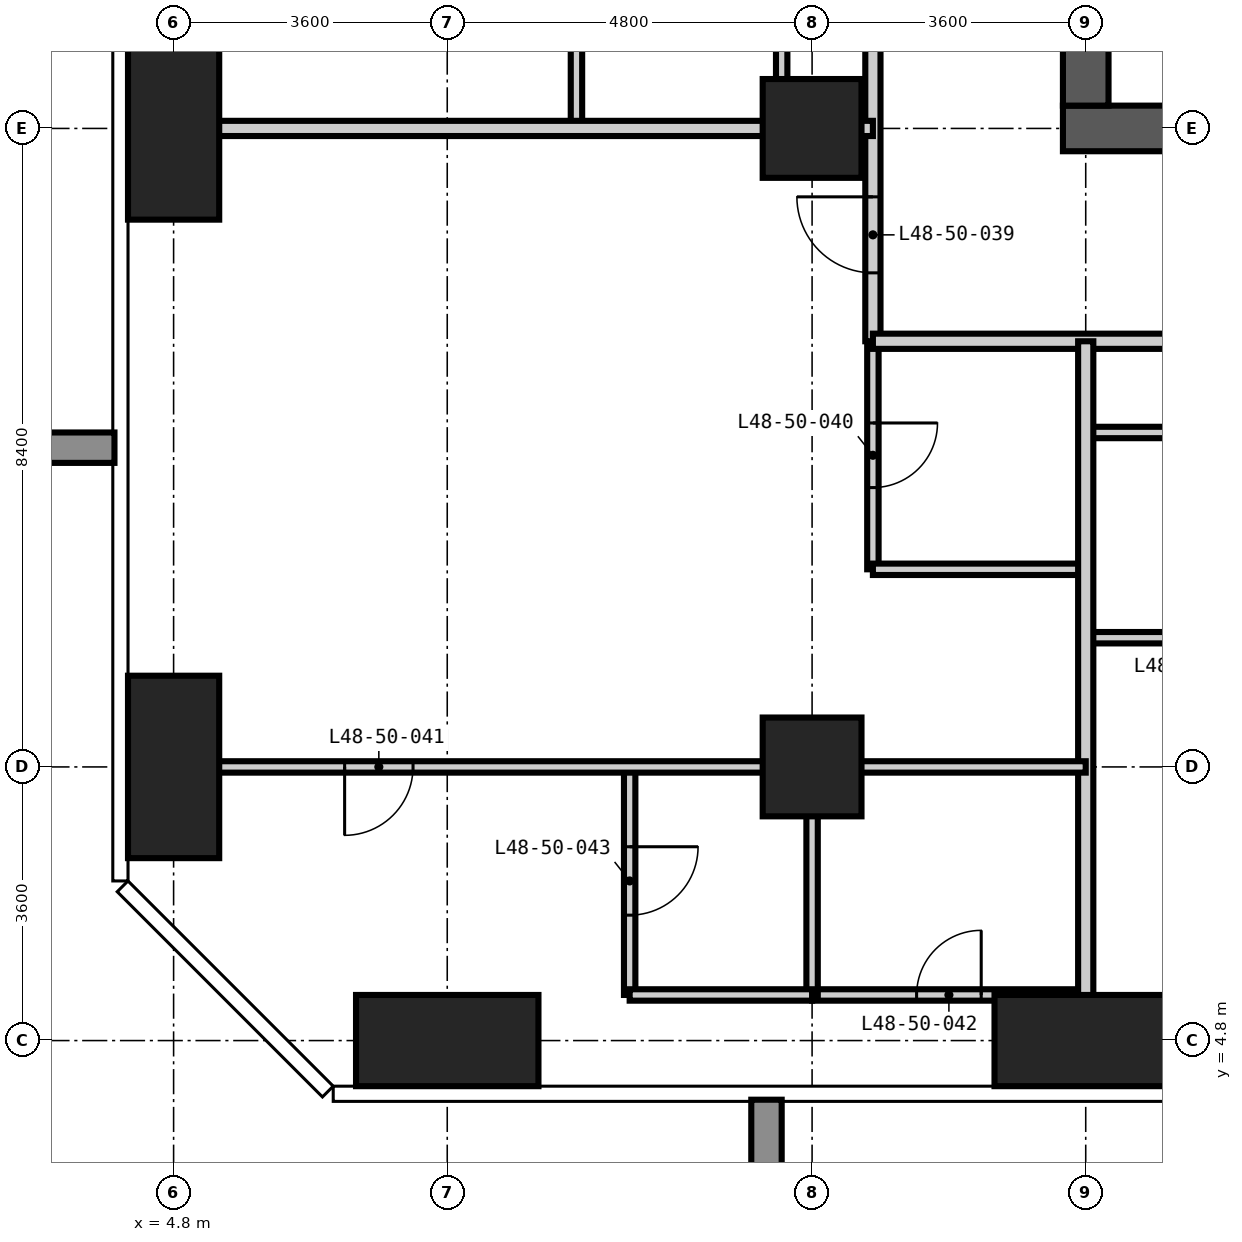
"""IFC4 building model, lengths in metres.
Left out: names, types, materials, properties, quantities, classifications, styles, units other than length and angle.
Written with IfcOpenShell. Run it as: python <this file> out.ifc"""

import sys

from ifc_helpers import new_model, si_unit, direction, frame, frame_2d, origin, origin_2d, place, context, subcontext, project, spatial, rectangle, extrude, element, fill, save


model = new_model("IFC4")
c1 = context("Model", 3, precision=1e-05, world=origin(), true_north=direction((0.0, 1.0)))
c2 = subcontext(c1, "Body", "Model", "MODEL_VIEW")
j1 = project(units=[si_unit("LENGTHUNIT", "METRE"), si_unit("PLANEANGLEUNIT", "RADIAN")], contexts=[c1])
p1 = place(None, origin())
s1 = spatial("IfcSite", under=j1, at=p1, CompositionType="ELEMENT")
p2 = place(p1, origin())
s2 = spatial("IfcBuilding", under=s1, at=p2, CompositionType="ELEMENT")
p3 = place(p2, frame((0.0, 0.0, 187.8)))
s3 = spatial("IfcBuildingStorey", under=s2, at=p3, CompositionType="ELEMENT", Elevation=187.8)
for number, where, z_axis, x_axis in (
    (1, (4.8, 8.4, -0.35), (0.0, 0.0, 1.0), (1.0, 0.0, 0.0)),
    (2, (4.8, 16.8, -0.35), (0.0, 0.0, 1.0), (1.0, 0.0, 0.0)),
):
    element("IfcColumn", number, at=place(p3, frame(where, z_axis=z_axis, x_axis=x_axis)), inside=s3, PredefinedType="COLUMN", context=c2, shape_type="SweptSolid", body=[
        extrude(rectangle(XDim=1.2, YDim=2.4, at=origin_2d()), origin(), (0.0, 0.0, 1.0), 3.6),
    ])
p4 = place(p3, frame((8.4, 4.8, -0.35), z_axis=(0.0, 0.0, 1.0), x_axis=(1.0, 0.0, 0.0)))
e3 = element("IfcColumn", 3, at=p4, inside=s3, PredefinedType="COLUMN", context=c2, shape_type="SweptSolid", body=[
    extrude(rectangle(XDim=2.4, YDim=1.2, at=origin_2d()), origin(), (0.0, 0.0, 1.0), 3.6),
])
for number, where, z_axis, x_axis in (
    (4, (13.2, 8.4, -0.35), (0.0, 0.0, 1.0), (1.0, 0.0, 0.0)),
    (5, (13.2, 16.8, -0.35), (0.0, 0.0, 1.0), (1.0, 0.0, 0.0)),
):
    element("IfcColumn", number, at=place(p3, frame(where, z_axis=z_axis, x_axis=x_axis)), inside=s3, PredefinedType="COLUMN", context=c2, shape_type="SweptSolid", body=[
        extrude(rectangle(XDim=1.3, YDim=1.3, at=origin_2d()), origin(), (0.0, 0.0, 1.0), 3.6),
    ])
p5 = place(p3, frame((16.8, 4.8, -0.35), z_axis=(0.0, 0.0, 1.0), x_axis=(1.0, 0.0, 0.0)))
e6 = element("IfcColumn", 6, at=p5, inside=s3, PredefinedType="COLUMN", context=c2, shape_type="SweptSolid", body=[
    extrude(rectangle(XDim=2.4, YDim=1.2, at=origin_2d()), origin(), (0.0, 0.0, 1.0), 3.6),
])
p6 = place(p3, frame((16.5, 16.8, -0.35), z_axis=(0.0, 0.0, 1.0), x_axis=(1.0, 0.0, 0.0)))
e7 = element("IfcWall", 7, at=p6, inside=s3, PredefinedType="SHEAR", context=c2, shape_type="SweptSolid", body=[
    extrude(rectangle(XDim=25.8, YDim=0.6, at=frame_2d((12.9, 0.0))), origin(), (0.0, 0.0, 1.0), 3.6),
])
p7 = place(p6, frame((12.4, 0.0, 0.35)))
e8 = element("IfcOpeningElement", 8, at=p7, cuts=e7, PredefinedType="OPENING", context=c2, shape_type="SweptSolid", body=[
    extrude(rectangle(XDim=1.0, YDim=2.1, at=frame_2d((0.5, 1.05))), frame((0.0, 0.31, 0.0), z_axis=(0.0, -1.0, 0.0), x_axis=(1.0, 0.0, 0.0)), (0.0, 0.0, 1.0), 0.62),
])
p8 = place(p6, frame((18.7, 0.0, 0.35)))
e9 = element("IfcOpeningElement", 9, at=p8, cuts=e7, PredefinedType="OPENING", context=c2, shape_type="SweptSolid", body=[
    extrude(rectangle(XDim=1.0, YDim=2.1, at=frame_2d((0.5, 1.05))), frame((0.0, 0.31, 0.0), z_axis=(0.0, -1.0, 0.0), x_axis=(1.0, 0.0, 0.0)), (0.0, 0.0, 1.0), 0.62),
])
p9 = place(p3, frame((16.8, 41.7, -0.35), z_axis=(0.0, 0.0, 1.0), x_axis=(0.0, -1.0, 0.0)))
e10 = element("IfcWall", 10, at=p9, inside=s3, PredefinedType="SHEAR", context=c2, shape_type="SweptSolid", body=[
    extrude(rectangle(XDim=24.6, YDim=0.6, at=frame_2d((12.3, 0.0))), origin(), (0.0, 0.0, 1.0), 3.6),
])
p10 = place(p9, frame((11.4, 0.0, 0.35)))
e11 = element("IfcOpeningElement", 11, at=p10, cuts=e10, PredefinedType="OPENING", context=c2, shape_type="SweptSolid", body=[
    extrude(rectangle(XDim=1.8, YDim=2.2, at=frame_2d((0.9, 1.1))), frame((0.0, 0.31, 0.0), z_axis=(0.0, -1.0, 0.0), x_axis=(1.0, 0.0, 0.0)), (0.0, 0.0, 1.0), 0.62),
])
p11 = place(p9, frame((20.2, 0.0, 0.35)))
e12 = element("IfcOpeningElement", 12, at=p11, cuts=e10, PredefinedType="OPENING", context=c2, shape_type="SweptSolid", body=[
    extrude(rectangle(XDim=1.0, YDim=2.1, at=frame_2d((0.5, 1.05))), frame((0.0, 0.31, 0.0), z_axis=(0.0, -1.0, 0.0), x_axis=(1.0, 0.0, 0.0)), (0.0, 0.0, 1.0), 0.62),
])
p12 = place(p9, frame((5.5, 0.0, 0.35)))
e13 = element("IfcOpeningElement", 13, at=p12, cuts=e10, PredefinedType="OPENING", context=c2, shape_type="SweptSolid", body=[
    extrude(rectangle(XDim=1.0, YDim=2.1, at=frame_2d((0.5, 1.05))), frame((0.0, 0.31, 0.0), z_axis=(0.0, -1.0, 0.0), x_axis=(1.0, 0.0, 0.0)), (0.0, 0.0, 1.0), 0.62),
])
p13 = place(p3, frame((10.1, 16.8, 0.0), z_axis=(0.0, 0.0, 1.0), x_axis=(0.0, 1.0, 0.0)))
e14 = element("IfcWall", 14, at=p13, inside=s3, PredefinedType="PARTITIONING", context=c2, shape_type="SweptSolid", body=[
    extrude(rectangle(XDim=3.0, YDim=0.15, at=frame_2d((1.5, 0.0))), origin(), (0.0, 0.0, 1.0), 3.25),
])
p14 = place(p3, frame((12.8, 16.8, 0.0), z_axis=(0.0, 0.0, 1.0), x_axis=(0.0, 1.0, 0.0)))
e15 = element("IfcWall", 15, at=p14, inside=s3, PredefinedType="PARTITIONING", context=c2, shape_type="SweptSolid", body=[
    extrude(rectangle(XDim=3.0, YDim=0.15, at=frame_2d((1.5, 0.0))), origin(), (0.0, 0.0, 1.0), 3.25),
])
p15 = place(p14, frame((1.075, 0.0, 0.0)))
e16 = element("IfcOpeningElement", 16, at=p15, cuts=e15, PredefinedType="OPENING", context=c2, shape_type="SweptSolid", body=[
    extrude(rectangle(XDim=0.85, YDim=2.1, at=frame_2d((0.425, 1.05))), frame((0.0, 0.085, 0.0), z_axis=(0.0, -1.0, 0.0), x_axis=(1.0, 0.0, 0.0)), (0.0, 0.0, 1.0), 0.17),
])
p16 = place(p3, frame((14.0, 11.0, 0.0), z_axis=(0.0, 0.0, 1.0), x_axis=(0.0, 1.0, 0.0)))
e17 = element("IfcWall", 17, at=p16, inside=s3, PredefinedType="PARTITIONING", context=c2, shape_type="SweptSolid", body=[
    extrude(rectangle(XDim=3.0, YDim=0.15, at=frame_2d((1.5, 0.0))), origin(), (0.0, 0.0, 1.0), 3.25),
])
p17 = place(p16, frame((1.075, 0.0, 0.0)))
e18 = element("IfcOpeningElement", 18, at=p17, cuts=e17, PredefinedType="OPENING", context=c2, shape_type="SweptSolid", body=[
    extrude(rectangle(XDim=0.85, YDim=2.1, at=frame_2d((0.425, 1.05))), frame((0.0, 0.085, 0.0), z_axis=(0.0, -1.0, 0.0), x_axis=(1.0, 0.0, 0.0)), (0.0, 0.0, 1.0), 0.17),
])
p18 = place(p3, frame((13.2, 5.4, 0.0), z_axis=(0.0, 0.0, 1.0), x_axis=(1.0, 0.0, 0.0)))
e19 = element("IfcWall", 19, at=p18, inside=s3, PredefinedType="PARTITIONING", context=c2, shape_type="SweptSolid", body=[
    extrude(rectangle(XDim=3.6, YDim=0.15, at=frame_2d((1.8, 0.0))), origin(), (0.0, 0.0, 1.0), 3.25),
])
p19 = place(p18, frame((1.375, 0.0, 0.0)))
e20 = element("IfcOpeningElement", 20, at=p19, cuts=e19, PredefinedType="OPENING", context=c2, shape_type="SweptSolid", body=[
    extrude(rectangle(XDim=0.85, YDim=2.1, at=frame_2d((0.425, 1.05))), frame((0.0, 0.085, 0.0), z_axis=(0.0, -1.0, 0.0), x_axis=(1.0, 0.0, 0.0)), (0.0, 0.0, 1.0), 0.17),
])
p20 = place(p3, frame((16.8, 10.1, 0.0), z_axis=(0.0, 0.0, 1.0), x_axis=(1.0, 0.0, 0.0)))
e21 = element("IfcWall", 21, at=p20, inside=s3, PredefinedType="PARTITIONING", context=c2, shape_type="SweptSolid", body=[
    extrude(rectangle(XDim=3.0, YDim=0.15, at=frame_2d((1.5, 0.0))), origin(), (0.0, 0.0, 1.0), 3.25),
])
p21 = place(p20, frame((1.075, 0.0, 0.0)))
e22 = element("IfcOpeningElement", 22, at=p21, cuts=e21, PredefinedType="OPENING", context=c2, shape_type="SweptSolid", body=[
    extrude(rectangle(XDim=0.85, YDim=2.1, at=frame_2d((0.425, 1.05))), frame((0.0, 0.085, 0.0), z_axis=(0.0, -1.0, 0.0), x_axis=(1.0, 0.0, 0.0)), (0.0, 0.0, 1.0), 0.17),
])
p22 = place(p3, frame((14.0, 11.0, 0.0), z_axis=(0.0, 0.0, 1.0), x_axis=(1.0, 0.0, 0.0)))
e23 = element("IfcWall", 23, at=p22, inside=s3, PredefinedType="PARTITIONING", context=c2, shape_type="SweptSolid", body=[
    extrude(rectangle(XDim=2.8, YDim=0.15, at=frame_2d((1.4, 0.0))), origin(), (0.0, 0.0, 1.0), 3.25),
])
p23 = place(p3, frame((16.8, 12.8, 0.0), z_axis=(0.0, 0.0, 1.0), x_axis=(1.0, 0.0, 0.0)))
e24 = element("IfcWall", 24, at=p23, inside=s3, PredefinedType="PARTITIONING", context=c2, shape_type="SweptSolid", body=[
    extrude(rectangle(XDim=3.0, YDim=0.15, at=frame_2d((1.5, 0.0))), origin(), (0.0, 0.0, 1.0), 3.25),
])
p24 = place(p3, frame((14.0, 14.0, 0.0), z_axis=(0.0, 0.0, 1.0), x_axis=(0.0, 1.0, 0.0)))
e25 = element("IfcWall", 25, at=p24, inside=s3, PredefinedType="PARTITIONING", context=c2, shape_type="SweptSolid", body=[
    extrude(rectangle(XDim=30.2, YDim=0.2, at=frame_2d((15.1, 0.0))), origin(), (0.0, 0.0, 1.0), 3.25),
])
p25 = place(p24, frame((6.5, 0.0, 0.0)))
e26 = element("IfcOpeningElement", 26, at=p25, cuts=e25, PredefinedType="OPENING", context=c2, shape_type="SweptSolid", body=[
    extrude(rectangle(XDim=1.0, YDim=2.2, at=frame_2d((0.5, 1.1))), frame((0.0, 0.11, 0.0), z_axis=(0.0, -1.0, 0.0), x_axis=(1.0, 0.0, 0.0)), (0.0, 0.0, 1.0), 0.22),
])
p26 = place(p24, frame((14.9, 0.0, 0.0)))
e27 = element("IfcOpeningElement", 27, at=p26, cuts=e25, PredefinedType="OPENING", context=c2, shape_type="SweptSolid", body=[
    extrude(rectangle(XDim=1.0, YDim=2.2, at=frame_2d((0.5, 1.1))), frame((0.0, 0.11, 0.0), z_axis=(0.0, -1.0, 0.0), x_axis=(1.0, 0.0, 0.0)), (0.0, 0.0, 1.0), 0.22),
])
p27 = place(p24, frame((23.3, 0.0, 0.0)))
e28 = element("IfcOpeningElement", 28, at=p27, cuts=e25, PredefinedType="OPENING", context=c2, shape_type="SweptSolid", body=[
    extrude(rectangle(XDim=1.0, YDim=2.2, at=frame_2d((0.5, 1.1))), frame((0.0, 0.11, 0.0), z_axis=(0.0, -1.0, 0.0), x_axis=(1.0, 0.0, 0.0)), (0.0, 0.0, 1.0), 0.22),
])
p28 = place(p24, frame((0.9, 0.0, 0.0)))
e29 = element("IfcOpeningElement", 29, at=p28, cuts=e25, PredefinedType="OPENING", context=c2, shape_type="SweptSolid", body=[
    extrude(rectangle(XDim=1.0, YDim=2.2, at=frame_2d((0.5, 1.1))), frame((0.0, 0.11, 0.0), z_axis=(0.0, -1.0, 0.0), x_axis=(1.0, 0.0, 0.0)), (0.0, 0.0, 1.0), 0.22),
])
p29 = place(p24, frame((28.7, 0.0, 0.0)))
e30 = element("IfcOpeningElement", 30, at=p29, cuts=e25, PredefinedType="OPENING", context=c2, shape_type="SweptSolid", body=[
    extrude(rectangle(XDim=1.0, YDim=2.2, at=frame_2d((0.5, 1.1))), frame((0.0, 0.11, 0.0), z_axis=(0.0, -1.0, 0.0), x_axis=(1.0, 0.0, 0.0)), (0.0, 0.0, 1.0), 0.22),
])
p30 = place(p3, frame((45.4, 14.0, 0.0), z_axis=(0.0, 0.0, 1.0), x_axis=(-1.0, 0.0, 0.0)))
e31 = element("IfcWall", 31, at=p30, inside=s3, PredefinedType="PARTITIONING", context=c2, shape_type="SweptSolid", body=[
    extrude(rectangle(XDim=31.4, YDim=0.2, at=frame_2d((15.7, 0.0))), origin(), (0.0, 0.0, 1.0), 3.25),
])
p31 = place(p30, frame((26.0, 0.0, 0.0)))
e32 = element("IfcOpeningElement", 32, at=p31, cuts=e31, PredefinedType="OPENING", context=c2, shape_type="SweptSolid", body=[
    extrude(rectangle(XDim=1.0, YDim=2.2, at=frame_2d((0.5, 1.1))), frame((0.0, 0.11, 0.0), z_axis=(0.0, -1.0, 0.0), x_axis=(1.0, 0.0, 0.0)), (0.0, 0.0, 1.0), 0.22),
])
p32 = place(p30, frame((19.7, 0.0, 0.0)))
e33 = element("IfcOpeningElement", 33, at=p32, cuts=e31, PredefinedType="OPENING", context=c2, shape_type="SweptSolid", body=[
    extrude(rectangle(XDim=1.0, YDim=2.2, at=frame_2d((0.5, 1.1))), frame((0.0, 0.11, 0.0), z_axis=(0.0, -1.0, 0.0), x_axis=(1.0, 0.0, 0.0)), (0.0, 0.0, 1.0), 0.22),
])
p33 = place(p30, frame((11.3, 0.0, 0.0)))
e34 = element("IfcOpeningElement", 34, at=p33, cuts=e31, PredefinedType="OPENING", context=c2, shape_type="SweptSolid", body=[
    extrude(rectangle(XDim=1.0, YDim=2.2, at=frame_2d((0.5, 1.1))), frame((0.0, 0.11, 0.0), z_axis=(0.0, -1.0, 0.0), x_axis=(1.0, 0.0, 0.0)), (0.0, 0.0, 1.0), 0.22),
])
p34 = place(p30, frame((5.0, 0.0, 0.0)))
e35 = element("IfcOpeningElement", 35, at=p34, cuts=e31, PredefinedType="OPENING", context=c2, shape_type="SweptSolid", body=[
    extrude(rectangle(XDim=1.0, YDim=2.2, at=frame_2d((0.5, 1.1))), frame((0.0, 0.11, 0.0), z_axis=(0.0, -1.0, 0.0), x_axis=(1.0, 0.0, 0.0)), (0.0, 0.0, 1.0), 0.22),
])
for number, where, z_axis, x_axis in (
    (36, (16.8, 4.182, 0.0), (0.0, 0.0, 1.0), (0.0, 1.0, 0.0)),
    (37, (4.182, 16.8, 0.0), (0.0, 0.0, 1.0), (1.0, 0.0, 0.0)),
):
    element("IfcWall", number, at=place(p3, frame(where, z_axis=z_axis, x_axis=x_axis)), inside=s3, PredefinedType="PARTITIONING", context=c2, shape_type="SweptSolid", body=[
        extrude(rectangle(XDim=9.818, YDim=0.2, at=frame_2d((4.909, 0.0))), origin(), (0.0, 0.0, 1.0), 3.25),
    ])
p35 = place(p3, frame((10.8, 5.4, 0.0), z_axis=(0.0, 0.0, 1.0), x_axis=(0.0, 1.0, 0.0)))
e38 = element("IfcWall", 38, at=p35, inside=s3, PredefinedType="PARTITIONING", context=c2, shape_type="SweptSolid", body=[
    extrude(rectangle(XDim=3.0, YDim=0.15, at=frame_2d((1.5, 0.0))), origin(), (0.0, 0.0, 1.0), 3.25),
])
p36 = place(p35, frame((1.05, 0.0, 0.0)))
e39 = element("IfcOpeningElement", 39, at=p36, cuts=e38, PredefinedType="OPENING", context=c2, shape_type="SweptSolid", body=[
    extrude(rectangle(XDim=0.9, YDim=2.1, at=frame_2d((0.45, 1.05))), frame((0.0, 0.085, 0.0), z_axis=(0.0, -1.0, 0.0), x_axis=(1.0, 0.0, 0.0)), (0.0, 0.0, 1.0), 0.17),
])
p37 = place(p3, frame((13.2, 5.4, 0.0), z_axis=(0.0, 0.0, 1.0), x_axis=(0.0, 1.0, 0.0)))
e40 = element("IfcWall", 40, at=p37, inside=s3, PredefinedType="PARTITIONING", context=c2, shape_type="SweptSolid", body=[
    extrude(rectangle(XDim=3.0, YDim=0.15, at=frame_2d((1.5, 0.0))), origin(), (0.0, 0.0, 1.0), 3.25),
])
p38 = place(p3, frame((10.8, 5.4, 0.0), z_axis=(0.0, 0.0, 1.0), x_axis=(1.0, 0.0, 0.0)))
e41 = element("IfcWall", 41, at=p38, inside=s3, PredefinedType="PARTITIONING", context=c2, shape_type="SweptSolid", body=[
    extrude(rectangle(XDim=2.4, YDim=0.15, at=frame_2d((1.2, 0.0))), origin(), (0.0, 0.0, 1.0), 3.25),
])
p39 = place(p3, frame((4.182, 8.4, 0.0), z_axis=(0.0, 0.0, 1.0), x_axis=(1.0, 0.0, 0.0)))
e42 = element("IfcWall", 42, at=p39, inside=s3, PredefinedType="PARTITIONING", context=c2, shape_type="SweptSolid", body=[
    extrude(rectangle(XDim=12.618, YDim=0.15, at=frame_2d((6.309, 0.0))), origin(), (0.0, 0.0, 1.0), 3.25),
])
p40 = place(p39, frame((2.868, 0.0, 0.0)))
e43 = element("IfcOpeningElement", 43, at=p40, cuts=e42, PredefinedType="OPENING", context=c2, shape_type="SweptSolid", body=[
    extrude(rectangle(XDim=0.9, YDim=2.1, at=frame_2d((0.45, 1.05))), frame((0.0, 0.085, 0.0), z_axis=(0.0, -1.0, 0.0), x_axis=(1.0, 0.0, 0.0)), (0.0, 0.0, 1.0), 0.17),
])
p41 = place(p28, origin())
e44 = element("IfcDoor", 44, at=p41, inside=s3, OperationType="SINGLE_SWING_RIGHT", PredefinedType="DOOR", context=c2, shape_type="SweptSolid", body=[
    extrude(rectangle(XDim=1.0, YDim=2.2, at=frame_2d((0.5, 1.1))), frame((0.0, 0.025, 0.0), z_axis=(0.0, -1.0, 0.0), x_axis=(1.0, 0.0, 0.0)), (0.0, 0.0, 1.0), 0.05),
])
fill(e29, e44)
p42 = place(p17, frame((0.85, 0.0, 0.0), z_axis=(0.0, 0.0, 1.0), x_axis=(-1.0, 0.0, 0.0)))
e45 = element("IfcDoor", 45, at=p42, inside=s3, OperationType="SINGLE_SWING_LEFT", PredefinedType="DOOR", context=c2, shape_type="SweptSolid", body=[
    extrude(rectangle(XDim=0.85, YDim=2.1, at=frame_2d((0.425, 1.05))), frame((0.0, 0.025, 0.0), z_axis=(0.0, -1.0, 0.0), x_axis=(1.0, 0.0, 0.0)), (0.0, 0.0, 1.0), 0.05),
])
fill(e18, e45)
p43 = place(p40, frame((0.9, 0.0, 0.0), z_axis=(0.0, 0.0, 1.0), x_axis=(-1.0, 0.0, 0.0)))
e46 = element("IfcDoor", 46, at=p43, inside=s3, OperationType="SINGLE_SWING_RIGHT", PredefinedType="DOOR", context=c2, shape_type="SweptSolid", body=[
    extrude(rectangle(XDim=0.9, YDim=2.1, at=frame_2d((0.45, 1.05))), frame((0.0, 0.025, 0.0), z_axis=(0.0, -1.0, 0.0), x_axis=(1.0, 0.0, 0.0)), (0.0, 0.0, 1.0), 0.05),
])
fill(e43, e46)
p44 = place(p19, origin())
e47 = element("IfcDoor", 47, at=p44, inside=s3, OperationType="SINGLE_SWING_RIGHT", PredefinedType="DOOR", context=c2, shape_type="SweptSolid", body=[
    extrude(rectangle(XDim=0.85, YDim=2.1, at=frame_2d((0.425, 1.05))), frame((0.0, 0.025, 0.0), z_axis=(0.0, -1.0, 0.0), x_axis=(1.0, 0.0, 0.0)), (0.0, 0.0, 1.0), 0.05),
])
fill(e20, e47)
p45 = place(p36, frame((0.9, 0.0, 0.0), z_axis=(0.0, 0.0, 1.0), x_axis=(-1.0, 0.0, 0.0)))
e48 = element("IfcDoor", 48, at=p45, inside=s3, OperationType="SINGLE_SWING_LEFT", PredefinedType="DOOR", context=c2, shape_type="SweptSolid", body=[
    extrude(rectangle(XDim=0.9, YDim=2.1, at=frame_2d((0.45, 1.05))), frame((0.0, 0.025, 0.0), z_axis=(0.0, -1.0, 0.0), x_axis=(1.0, 0.0, 0.0)), (0.0, 0.0, 1.0), 0.05),
])
fill(e39, e48)
save(model, sys.argv[1])
